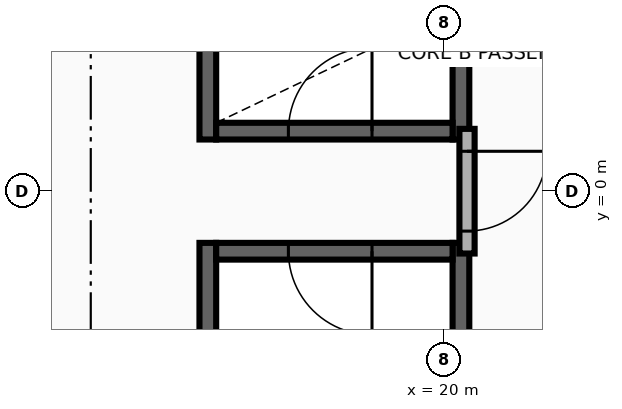
"""IFC4 building model, lengths in metres.
Left out: names, types, materials, properties, quantities, classifications, styles, units other than length and angle.
Written with IfcOpenShell. Run it as: python <this file> out.ifc"""

import sys

from ifc_helpers import new_model, si_unit, direction, frame, frame_2d, origin, place, context, subcontext, project, spatial, rectangle, extrude, element, fill, save


model = new_model("IFC4")
c1 = context("Model", 3, precision=1e-05, world=origin(), true_north=direction((0.0, 1.0)))
c2 = subcontext(c1, "Body", "Model", "MODEL_VIEW")
j1 = project(units=[si_unit("LENGTHUNIT", "METRE"), si_unit("PLANEANGLEUNIT", "RADIAN")], contexts=[c1])
p1 = place(None, origin())
s1 = spatial("IfcSite", under=j1, at=p1, CompositionType="ELEMENT")
p2 = place(p1, origin())
s2 = spatial("IfcBuilding", under=s1, at=p2, CompositionType="ELEMENT")
p3 = place(p2, frame((0.0, 0.0, 176.55)))
s3 = spatial("IfcBuildingStorey", under=s2, at=p3, CompositionType="ELEMENT", Elevation=176.55)
for number, where, z_axis, x_axis in (
    (1, (16.89, 0.68, 0.0), (0.0, 0.0, 1.0), (0.0, 1.0, 0.0)),
    (2, (20.22, 0.68, 0.0), (0.0, 0.0, 1.0), (0.0, 1.0, 0.0)),
):
    element("IfcWall", number, at=place(p3, frame(where, z_axis=z_axis, x_axis=x_axis)), inside=s3, PredefinedType="SHEAR", context=c2, shape_type="SweptSolid", body=[
        extrude(rectangle(XDim=8.595, YDim=0.22, at=frame_2d((4.297, 0.0))), origin(), (0.0, 0.0, 1.0), 3.63),
    ])
p4 = place(p3, frame((17.0, 0.79, 0.0), z_axis=(0.0, 0.0, 1.0), x_axis=(1.0, 0.0, 0.0)))
e3 = element("IfcWall", 3, at=p4, inside=s3, PredefinedType="SHEAR", context=c2, shape_type="SweptSolid", body=[
    extrude(rectangle(XDim=3.11, YDim=0.22, at=frame_2d((1.555, 0.0))), origin(), (0.0, 0.0, 1.0), 3.63),
])
p5 = place(p4, frame((0.95, 0.0, 0.0)))
e4 = element("IfcOpeningElement", 4, at=p5, cuts=e3, PredefinedType="OPENING", context=c2, shape_type="SweptSolid", body=[
    extrude(rectangle(XDim=1.1, YDim=2.15, at=frame_2d((0.55, 1.075))), frame((0.0, 0.125, 0.0), z_axis=(0.0, -1.0, 0.0), x_axis=(1.0, 0.0, 0.0)), (0.0, 0.0, 1.0), 0.25),
])
for number, where, z_axis, x_axis in (
    (5, (16.89, -9.275, 0.0), (0.0, 0.0, 1.0), (0.0, 1.0, 0.0)),
    (6, (20.22, -9.275, 0.0), (0.0, 0.0, 1.0), (0.0, 1.0, 0.0)),
):
    element("IfcWall", number, at=place(p3, frame(where, z_axis=z_axis, x_axis=x_axis)), inside=s3, PredefinedType="SHEAR", context=c2, shape_type="SweptSolid", body=[
        extrude(rectangle(XDim=8.595, YDim=0.22, at=frame_2d((4.297, 0.0))), origin(), (0.0, 0.0, 1.0), 3.63),
    ])
p6 = place(p3, frame((17.0, -0.79, 0.0), z_axis=(0.0, 0.0, 1.0), x_axis=(1.0, 0.0, 0.0)))
e7 = element("IfcWall", 7, at=p6, inside=s3, PredefinedType="SHEAR", context=c2, shape_type="SweptSolid", body=[
    extrude(rectangle(XDim=3.11, YDim=0.22, at=frame_2d((1.555, 0.0))), origin(), (0.0, 0.0, 1.0), 3.63),
])
p7 = place(p6, frame((0.95, 0.0, 0.0)))
e8 = element("IfcOpeningElement", 8, at=p7, cuts=e7, PredefinedType="OPENING", context=c2, shape_type="SweptSolid", body=[
    extrude(rectangle(XDim=1.1, YDim=2.15, at=frame_2d((0.55, 1.075))), frame((0.0, 0.125, 0.0), z_axis=(0.0, -1.0, 0.0), x_axis=(1.0, 0.0, 0.0)), (0.0, 0.0, 1.0), 0.25),
])
p8 = place(p3, frame((20.3, -0.82, 0.0), z_axis=(0.0, 0.0, 1.0), x_axis=(0.0, 1.0, 0.0)))
e9 = element("IfcWall", 9, at=p8, inside=s3, PredefinedType="PARTITIONING", context=c2, shape_type="SweptSolid", body=[
    extrude(rectangle(XDim=1.64, YDim=0.2, at=frame_2d((0.82, 0.0))), origin(), (0.0, 0.0, 1.0), 3.63),
])
p9 = place(p8, frame((0.295, 0.0, 0.0)))
e10 = element("IfcOpeningElement", 10, at=p9, cuts=e9, PredefinedType="OPENING", context=c2, shape_type="SweptSolid", body=[
    extrude(rectangle(XDim=1.05, YDim=2.15, at=frame_2d((0.525, 1.075))), frame((0.0, 0.115, 0.0), z_axis=(0.0, -1.0, 0.0), x_axis=(1.0, 0.0, 0.0)), (0.0, 0.0, 1.0), 0.23),
])
p10 = place(p9, frame((1.05, 0.0, 0.0), z_axis=(0.0, 0.0, 1.0), x_axis=(-1.0, 0.0, 0.0)))
e11 = element("IfcDoor", 11, at=p10, inside=s3, OperationType="SINGLE_SWING_LEFT", PredefinedType="DOOR", context=c2, shape_type="SweptSolid", body=[
    extrude(rectangle(XDim=1.05, YDim=2.15, at=frame_2d((0.525, 1.075))), frame((0.0, 0.025, 0.0), z_axis=(0.0, -1.0, 0.0), x_axis=(1.0, 0.0, 0.0)), (0.0, 0.0, 1.0), 0.05),
])
fill(e10, e11)
p11 = place(p5, origin())
e12 = element("IfcDoor", 12, at=p11, inside=s3, OperationType="SINGLE_SWING_RIGHT", PredefinedType="DOOR", context=c2, shape_type="SweptSolid", body=[
    extrude(rectangle(XDim=1.1, YDim=2.15, at=frame_2d((0.55, 1.075))), frame((0.0, 0.025, 0.0), z_axis=(0.0, -1.0, 0.0), x_axis=(1.0, 0.0, 0.0)), (0.0, 0.0, 1.0), 0.05),
])
fill(e4, e12)
p12 = place(p7, frame((1.1, 0.0, 0.0), z_axis=(0.0, 0.0, 1.0), x_axis=(-1.0, 0.0, 0.0)))
e13 = element("IfcDoor", 13, at=p12, inside=s3, OperationType="SINGLE_SWING_LEFT", PredefinedType="DOOR", context=c2, shape_type="SweptSolid", body=[
    extrude(rectangle(XDim=1.1, YDim=2.15, at=frame_2d((0.55, 1.075))), frame((0.0, 0.025, 0.0), z_axis=(0.0, -1.0, 0.0), x_axis=(1.0, 0.0, 0.0)), (0.0, 0.0, 1.0), 0.05),
])
fill(e8, e13)
save(model, sys.argv[1])
